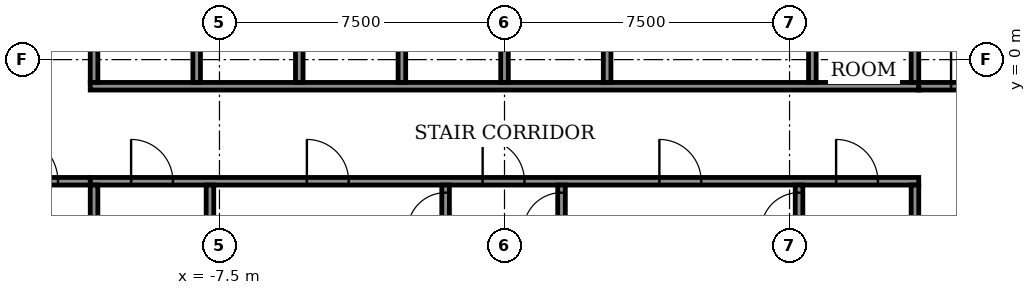
"""IFC4 building model, lengths in metres.
Left out: names, types, materials, properties, quantities, classifications, styles, units other than length and angle.
Written with IfcOpenShell. Run it as: python <this file> out.ifc"""

import sys

from ifc_helpers import new_model, si_unit, direction, frame, frame_2d, origin, place, context, subcontext, project, spatial, rectangle, extrude, element, fill, save


model = new_model("IFC4")
c1 = context("Model", 3, precision=1e-05, world=origin(), true_north=direction((0.0, 1.0)))
c2 = subcontext(c1, "Body", "Model", "MODEL_VIEW")
j1 = project(units=[si_unit("LENGTHUNIT", "METRE"), si_unit("PLANEANGLEUNIT", "RADIAN")], contexts=[c1])
p1 = place(None, origin())
s1 = spatial("IfcSite", under=j1, at=p1, CompositionType="ELEMENT")
p2 = place(p1, origin())
s2 = spatial("IfcBuilding", under=s1, at=p2, CompositionType="ELEMENT")
p3 = place(p2, frame((0.0, 0.0, 71.1)))
s3 = spatial("IfcBuildingStorey", under=s2, at=p3, CompositionType="ELEMENT", Elevation=71.1)
p4 = place(p3, frame((-10.9, -3.2, 0.0), z_axis=(0.0, 0.0, 1.0), x_axis=(1.0, 0.0, 0.0)))
e1 = element("IfcWall", 1, at=p4, inside=s3, PredefinedType="SHEAR", context=c2, shape_type="SweptSolid", body=[
    extrude(rectangle(XDim=21.8, YDim=0.2, at=frame_2d((10.9, 0.0))), origin(), (0.0, 0.0, 1.0), 3.05),
])
p5 = place(p4, frame((1.075, 0.0, 0.0)))
e2 = element("IfcOpeningElement", 2, at=p5, cuts=e1, PredefinedType="OPENING", context=c2, shape_type="SweptSolid", body=[
    extrude(rectangle(XDim=1.1, YDim=2.1, at=frame_2d((0.55, 1.05))), frame((0.0, 0.11, 0.0), z_axis=(0.0, -1.0, 0.0), x_axis=(1.0, 0.0, 0.0)), (0.0, 0.0, 1.0), 0.22),
])
p6 = place(p4, frame((10.325, 0.0, 0.0)))
e3 = element("IfcOpeningElement", 3, at=p6, cuts=e1, PredefinedType="OPENING", context=c2, shape_type="SweptSolid", body=[
    extrude(rectangle(XDim=1.1, YDim=2.1, at=frame_2d((0.55, 1.05))), frame((0.0, 0.11, 0.0), z_axis=(0.0, -1.0, 0.0), x_axis=(1.0, 0.0, 0.0)), (0.0, 0.0, 1.0), 0.22),
])
p7 = place(p4, frame((19.625, 0.0, 0.0)))
e4 = element("IfcOpeningElement", 4, at=p7, cuts=e1, PredefinedType="OPENING", context=c2, shape_type="SweptSolid", body=[
    extrude(rectangle(XDim=1.1, YDim=2.1, at=frame_2d((0.55, 1.05))), frame((0.0, 0.11, 0.0), z_axis=(0.0, -1.0, 0.0), x_axis=(1.0, 0.0, 0.0)), (0.0, 0.0, 1.0), 0.22),
])
p8 = place(p4, frame((5.7, 0.0, 0.0)))
e5 = element("IfcOpeningElement", 5, at=p8, cuts=e1, PredefinedType="OPENING", context=c2, shape_type="SweptSolid", body=[
    extrude(rectangle(XDim=1.1, YDim=2.1, at=frame_2d((0.55, 1.05))), frame((0.0, 0.11, 0.0), z_axis=(0.0, -1.0, 0.0), x_axis=(1.0, 0.0, 0.0)), (0.0, 0.0, 1.0), 0.22),
])
p9 = place(p4, frame((14.975, 0.0, 0.0)))
e6 = element("IfcOpeningElement", 6, at=p9, cuts=e1, PredefinedType="OPENING", context=c2, shape_type="SweptSolid", body=[
    extrude(rectangle(XDim=1.1, YDim=2.1, at=frame_2d((0.55, 1.05))), frame((0.0, 0.11, 0.0), z_axis=(0.0, -1.0, 0.0), x_axis=(1.0, 0.0, 0.0)), (0.0, 0.0, 1.0), 0.22),
])
p10 = place(p3, frame((-10.9, -0.7, 0.0), z_axis=(0.0, 0.0, 1.0), x_axis=(1.0, 0.0, 0.0)))
e7 = element("IfcWall", 7, at=p10, inside=s3, PredefinedType="SHEAR", context=c2, shape_type="SweptSolid", body=[
    extrude(rectangle(XDim=21.8, YDim=0.2, at=frame_2d((10.9, 0.0))), origin(), (0.0, 0.0, 1.0), 3.05),
])
for number, where, z_axis, x_axis in (
    (8, (-10.8, -10.8, 0.0), (0.0, 0.0, 1.0), (0.0, 1.0, 0.0)),
    (9, (-7.75, -10.8, 0.0), (0.0, 0.0, 1.0), (0.0, 1.0, 0.0)),
):
    element("IfcWall", number, at=place(p3, frame(where, z_axis=z_axis, x_axis=x_axis)), inside=s3, PredefinedType="SHEAR", context=c2, shape_type="SweptSolid", body=[
        extrude(rectangle(XDim=7.5, YDim=0.2, at=frame_2d((3.75, 0.0))), origin(), (0.0, 0.0, 1.0), 3.05),
    ])
p11 = place(p3, frame((-1.55, -10.8, 0.0), z_axis=(0.0, 0.0, 1.0), x_axis=(0.0, 1.0, 0.0)))
e10 = element("IfcWall", 10, at=p11, inside=s3, PredefinedType="SHEAR", context=c2, shape_type="SweptSolid", body=[
    extrude(rectangle(XDim=7.5, YDim=0.2, at=frame_2d((3.75, 0.0))), origin(), (0.0, 0.0, 1.0), 3.05),
])
p12 = place(p11, frame((6.3, 0.0, 0.0)))
e11 = element("IfcOpeningElement", 11, at=p12, cuts=e10, PredefinedType="OPENING", context=c2, shape_type="SweptSolid", body=[
    extrude(rectangle(XDim=1.0, YDim=2.1, at=frame_2d((0.5, 1.05))), frame((0.0, 0.11, 0.0), z_axis=(0.0, -1.0, 0.0), x_axis=(1.0, 0.0, 0.0)), (0.0, 0.0, 1.0), 0.22),
])
p13 = place(p3, frame((1.5, -10.8, 0.0), z_axis=(0.0, 0.0, 1.0), x_axis=(0.0, 1.0, 0.0)))
e12 = element("IfcWall", 12, at=p13, inside=s3, PredefinedType="SHEAR", context=c2, shape_type="SweptSolid", body=[
    extrude(rectangle(XDim=7.5, YDim=0.2, at=frame_2d((3.75, 0.0))), origin(), (0.0, 0.0, 1.0), 3.05),
])
p14 = place(p13, frame((6.3, 0.0, 0.0)))
e13 = element("IfcOpeningElement", 13, at=p14, cuts=e12, PredefinedType="OPENING", context=c2, shape_type="SweptSolid", body=[
    extrude(rectangle(XDim=1.0, YDim=2.1, at=frame_2d((0.5, 1.05))), frame((0.0, 0.11, 0.0), z_axis=(0.0, -1.0, 0.0), x_axis=(1.0, 0.0, 0.0)), (0.0, 0.0, 1.0), 0.22),
])
p15 = place(p3, frame((7.75, -10.8, 0.0), z_axis=(0.0, 0.0, 1.0), x_axis=(0.0, 1.0, 0.0)))
e14 = element("IfcWall", 14, at=p15, inside=s3, PredefinedType="SHEAR", context=c2, shape_type="SweptSolid", body=[
    extrude(rectangle(XDim=7.5, YDim=0.2, at=frame_2d((3.75, 0.0))), origin(), (0.0, 0.0, 1.0), 3.05),
])
p16 = place(p15, frame((6.3, 0.0, 0.0)))
e15 = element("IfcOpeningElement", 15, at=p16, cuts=e14, PredefinedType="OPENING", context=c2, shape_type="SweptSolid", body=[
    extrude(rectangle(XDim=1.0, YDim=2.1, at=frame_2d((0.5, 1.05))), frame((0.0, 0.11, 0.0), z_axis=(0.0, -1.0, 0.0), x_axis=(1.0, 0.0, 0.0)), (0.0, 0.0, 1.0), 0.22),
])
p17 = place(p3, frame((10.8, -10.8, 0.0), z_axis=(0.0, 0.0, 1.0), x_axis=(0.0, 1.0, 0.0)))
e16 = element("IfcWall", 16, at=p17, inside=s3, PredefinedType="SHEAR", context=c2, shape_type="SweptSolid", body=[
    extrude(rectangle(XDim=7.5, YDim=0.2, at=frame_2d((3.75, 0.0))), origin(), (0.0, 0.0, 1.0), 3.05),
])
for number, where, z_axis, x_axis in (
    (17, (-10.8, -0.6, 0.0), (0.0, 0.0, 1.0), (0.0, 1.0, 0.0)),
    (18, (-8.1, -0.6, 0.0), (0.0, 0.0, 1.0), (0.0, 1.0, 0.0)),
    (19, (-5.4, -0.6, 0.0), (0.0, 0.0, 1.0), (0.0, 1.0, 0.0)),
    (20, (-2.7, -0.6, 0.0), (0.0, 0.0, 1.0), (0.0, 1.0, 0.0)),
    (21, (0.0, -0.6, 0.0), (0.0, 0.0, 1.0), (0.0, 1.0, 0.0)),
    (22, (2.7, -0.6, 0.0), (0.0, 0.0, 1.0), (0.0, 1.0, 0.0)),
):
    element("IfcWall", number, at=place(p3, frame(where, z_axis=z_axis, x_axis=x_axis)), inside=s3, PredefinedType="SHEAR", context=c2, shape_type="SweptSolid", body=[
        extrude(rectangle(XDim=2.5, YDim=0.2, at=frame_2d((1.25, 0.0))), origin(), (0.0, 0.0, 1.0), 3.05),
    ])
for number, where, z_axis, x_axis in (
    (23, (8.1, -0.6, 0.0), (0.0, 0.0, 1.0), (0.0, 1.0, 0.0)),
    (24, (10.8, -0.6, 0.0), (0.0, 0.0, 1.0), (0.0, 1.0, 0.0)),
):
    element("IfcWall", number, at=place(p3, frame(where, z_axis=z_axis, x_axis=x_axis)), inside=s3, PredefinedType="STANDARD", context=c2, shape_type="SweptSolid", body=[
        extrude(rectangle(XDim=2.5, YDim=0.2, at=frame_2d((1.25, 0.0))), origin(), (0.0, 0.0, 1.0), 3.05),
    ])
p18 = place(p3, frame((-13.8, -3.2, 0.0), z_axis=(0.0, 0.0, 1.0), x_axis=(1.0, 0.0, 0.0)))
e25 = element("IfcWall", 25, at=p18, inside=s3, PredefinedType="STANDARD", context=c2, shape_type="SweptSolid", body=[
    extrude(rectangle(XDim=2.9, YDim=0.2, at=frame_2d((1.45, 0.0))), origin(), (0.0, 0.0, 1.0), 3.05),
])
p19 = place(p18, frame((0.85, 0.0, 0.0)))
e26 = element("IfcOpeningElement", 26, at=p19, cuts=e25, PredefinedType="OPENING", context=c2, shape_type="SweptSolid", body=[
    extrude(rectangle(XDim=1.2, YDim=2.1, at=frame_2d((0.6, 1.05))), frame((0.0, 0.11, 0.0), z_axis=(0.0, -1.0, 0.0), x_axis=(1.0, 0.0, 0.0)), (0.0, 0.0, 1.0), 0.22),
])
p20 = place(p3, frame((10.9, -0.7, 0.0), z_axis=(0.0, 0.0, 1.0), x_axis=(1.0, 0.0, 0.0)))
e27 = element("IfcWall", 27, at=p20, inside=s3, PredefinedType="STANDARD", context=c2, shape_type="SweptSolid", body=[
    extrude(rectangle(XDim=2.9, YDim=0.2, at=frame_2d((1.45, 0.0))), origin(), (0.0, 0.0, 1.0), 3.05),
])
p21 = place(p20, frame((0.85, 0.0, 0.0)))
e28 = element("IfcOpeningElement", 28, at=p21, cuts=e27, PredefinedType="OPENING", context=c2, shape_type="SweptSolid", body=[
    extrude(rectangle(XDim=1.2, YDim=2.1, at=frame_2d((0.6, 1.05))), frame((0.0, 0.11, 0.0), z_axis=(0.0, -1.0, 0.0), x_axis=(1.0, 0.0, 0.0)), (0.0, 0.0, 1.0), 0.22),
])
p22 = place(p5, origin())
e29 = element("IfcDoor", 29, at=p22, inside=s3, OperationType="SINGLE_SWING_RIGHT", PredefinedType="DOOR", context=c2, shape_type="SweptSolid", body=[
    extrude(rectangle(XDim=1.1, YDim=2.1, at=frame_2d((0.55, 1.05))), frame((0.0, 0.025, 0.0), z_axis=(0.0, -1.0, 0.0), x_axis=(1.0, 0.0, 0.0)), (0.0, 0.0, 1.0), 0.05),
])
fill(e2, e29)
p23 = place(p6, origin())
e30 = element("IfcDoor", 30, at=p23, inside=s3, OperationType="SINGLE_SWING_RIGHT", PredefinedType="DOOR", context=c2, shape_type="SweptSolid", body=[
    extrude(rectangle(XDim=1.1, YDim=2.1, at=frame_2d((0.55, 1.05))), frame((0.0, 0.025, 0.0), z_axis=(0.0, -1.0, 0.0), x_axis=(1.0, 0.0, 0.0)), (0.0, 0.0, 1.0), 0.05),
])
fill(e3, e30)
p24 = place(p7, origin())
e31 = element("IfcDoor", 31, at=p24, inside=s3, OperationType="SINGLE_SWING_RIGHT", PredefinedType="DOOR", context=c2, shape_type="SweptSolid", body=[
    extrude(rectangle(XDim=1.1, YDim=2.1, at=frame_2d((0.55, 1.05))), frame((0.0, 0.025, 0.0), z_axis=(0.0, -1.0, 0.0), x_axis=(1.0, 0.0, 0.0)), (0.0, 0.0, 1.0), 0.05),
])
fill(e4, e31)
p25 = place(p8, origin())
e32 = element("IfcDoor", 32, at=p25, inside=s3, OperationType="SINGLE_SWING_LEFT", PredefinedType="DOOR", context=c2, shape_type="SweptSolid", body=[
    extrude(rectangle(XDim=1.1, YDim=2.1, at=frame_2d((0.55, 1.05))), frame((0.0, 0.025, 0.0), z_axis=(0.0, -1.0, 0.0), x_axis=(1.0, 0.0, 0.0)), (0.0, 0.0, 1.0), 0.05),
])
fill(e5, e32)
p26 = place(p9, origin())
e33 = element("IfcDoor", 33, at=p26, inside=s3, OperationType="SINGLE_SWING_LEFT", PredefinedType="DOOR", context=c2, shape_type="SweptSolid", body=[
    extrude(rectangle(XDim=1.1, YDim=2.1, at=frame_2d((0.55, 1.05))), frame((0.0, 0.025, 0.0), z_axis=(0.0, -1.0, 0.0), x_axis=(1.0, 0.0, 0.0)), (0.0, 0.0, 1.0), 0.05),
])
fill(e6, e33)
p27 = place(p12, origin())
e34 = element("IfcDoor", 34, at=p27, inside=s3, OperationType="SINGLE_SWING_RIGHT", PredefinedType="DOOR", context=c2, shape_type="SweptSolid", body=[
    extrude(rectangle(XDim=1.0, YDim=2.1, at=frame_2d((0.5, 1.05))), frame((0.0, 0.025, 0.0), z_axis=(0.0, -1.0, 0.0), x_axis=(1.0, 0.0, 0.0)), (0.0, 0.0, 1.0), 0.05),
])
fill(e11, e34)
p28 = place(p14, origin())
e35 = element("IfcDoor", 35, at=p28, inside=s3, OperationType="SINGLE_SWING_RIGHT", PredefinedType="DOOR", context=c2, shape_type="SweptSolid", body=[
    extrude(rectangle(XDim=1.0, YDim=2.1, at=frame_2d((0.5, 1.05))), frame((0.0, 0.025, 0.0), z_axis=(0.0, -1.0, 0.0), x_axis=(1.0, 0.0, 0.0)), (0.0, 0.0, 1.0), 0.05),
])
fill(e13, e35)
p29 = place(p16, origin())
e36 = element("IfcDoor", 36, at=p29, inside=s3, OperationType="SINGLE_SWING_RIGHT", PredefinedType="DOOR", context=c2, shape_type="SweptSolid", body=[
    extrude(rectangle(XDim=1.0, YDim=2.1, at=frame_2d((0.5, 1.05))), frame((0.0, 0.025, 0.0), z_axis=(0.0, -1.0, 0.0), x_axis=(1.0, 0.0, 0.0)), (0.0, 0.0, 1.0), 0.05),
])
fill(e15, e36)
p30 = place(p19, origin())
e37 = element("IfcDoor", 37, at=p30, inside=s3, OperationType="SINGLE_SWING_LEFT", PredefinedType="DOOR", context=c2, shape_type="SweptSolid", body=[
    extrude(rectangle(XDim=1.2, YDim=2.1, at=frame_2d((0.6, 1.05))), frame((0.0, 0.025, 0.0), z_axis=(0.0, -1.0, 0.0), x_axis=(1.0, 0.0, 0.0)), (0.0, 0.0, 1.0), 0.05),
])
fill(e26, e37)
p31 = place(p21, origin())
e38 = element("IfcDoor", 38, at=p31, inside=s3, OperationType="SINGLE_SWING_LEFT", PredefinedType="DOOR", context=c2, shape_type="SweptSolid", body=[
    extrude(rectangle(XDim=1.2, YDim=2.1, at=frame_2d((0.6, 1.05))), frame((0.0, 0.025, 0.0), z_axis=(0.0, -1.0, 0.0), x_axis=(1.0, 0.0, 0.0)), (0.0, 0.0, 1.0), 0.05),
])
fill(e28, e38)
save(model, sys.argv[1])
